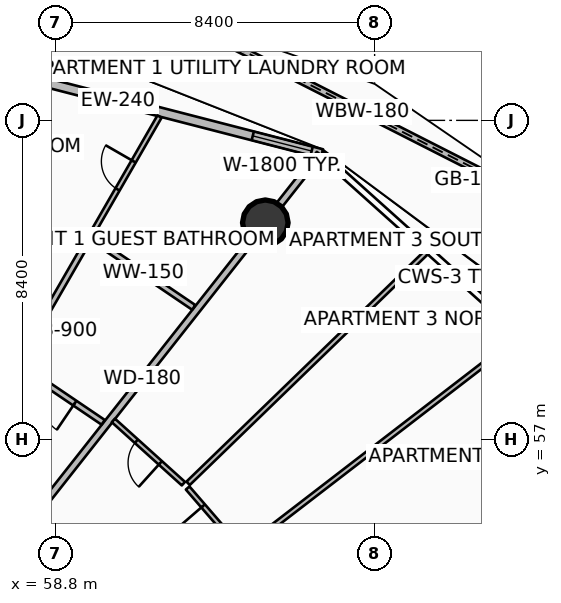
"""IFC4 building model, lengths in metres.
Left out: names, types, materials, properties, quantities, classifications, styles, units other than length and angle.
Written with IfcOpenShell. Run it as: python <this file> out.ifc"""

import sys

from ifc_helpers import new_model, si_unit, direction, frame, frame_2d, origin, origin_2d, place, context, subcontext, project, spatial, polyline, rectangle, circle, outline, extrude, element, fill, save


model = new_model("IFC4")
c1 = context("Model", 3, precision=1e-05, world=origin(), true_north=direction((0.0, 1.0)))
c2 = subcontext(c1, "Body", "Model", "MODEL_VIEW")
j1 = project(units=[si_unit("LENGTHUNIT", "METRE"), si_unit("PLANEANGLEUNIT", "RADIAN")], contexts=[c1])
p1 = place(None, origin())
s1 = spatial("IfcSite", under=j1, at=p1, CompositionType="ELEMENT")
p2 = place(p1, origin())
s2 = spatial("IfcBuilding", under=s1, at=p2, CompositionType="ELEMENT")
p3 = place(p2, frame((0.0, 0.0, 108.9)))
s3 = spatial("IfcBuildingStorey", under=s2, at=p3, CompositionType="ELEMENT", Elevation=108.9)
p4 = place(p3, frame((64.323, 62.706, 0.0), z_axis=(0.0, 0.0, 1.0), x_axis=(1.0, 0.0, 0.0)))
e1 = element("IfcColumn", 1, at=p4, inside=s3, PredefinedType="COLUMN", context=c2, shape_type="SweptSolid", body=[
    extrude(circle(Radius=0.6, at=origin_2d()), origin(), (0.0, 0.0, 1.0), 3.5),
])
p5 = place(p3, frame((72.201, 62.926, 0.0), z_axis=(0.0, 0.0, 1.0), x_axis=(-0.891327308183, 0.453360375074, 0.0)))
e2 = element("IfcWall", 2, at=p5, inside=s3, PredefinedType="PARAPET", context=c2, shape_type="SweptSolid", body=[
    extrude(outline(polyline([(0.0, 0.0), (11.943, 0.0), (11.942, 1.348), (5.971, 1.562), (0.0, 1.747), (0.0, 0.0)])), frame((0.0, 0.09, 0.0), z_axis=(0.0, -1.0, 0.0), x_axis=(1.0, 0.0, 0.0)), (0.0, 0.0, 1.0), 0.18),
])
p6 = place(p3, frame((65.814, 64.523, 0.0), z_axis=(0.0, 0.0, 1.0), x_axis=(-0.968356180858, 0.249572248045, 0.0)))
e3 = element("IfcWall", 3, at=p6, inside=s3, PredefinedType="SOLIDWALL", context=c2, shape_type="SweptSolid", body=[
    extrude(rectangle(XDim=11.084, YDim=0.24, at=frame_2d((5.542, 0.0))), origin(), (0.0, 0.0, 1.0), 2.45),
])
p7 = place(p6, frame((8.865, 0.0, 0.0)))
e4 = element("IfcOpeningElement", 4, at=p7, cuts=e3, PredefinedType="OPENING", context=c2, shape_type="SweptSolid", body=[
    extrude(rectangle(XDim=1.45, YDim=2.15, at=frame_2d((0.725, 1.075))), frame((0.0, 0.13, 0.0), z_axis=(0.0, -1.0, 0.0), x_axis=(1.0, 0.0, 0.0)), (0.0, 0.0, 1.0), 0.26),
])
p8 = place(p6, frame((0.28, 0.0, 0.65)))
e5 = element("IfcOpeningElement", 5, at=p8, cuts=e3, PredefinedType="OPENING", context=c2, shape_type="SweptSolid", body=[
    extrude(rectangle(XDim=1.6, YDim=1.5, at=frame_2d((0.8, 0.75))), frame((0.0, 0.13, 0.0), z_axis=(0.0, -1.0, 0.0), x_axis=(1.0, 0.0, 0.0)), (0.0, 0.0, 1.0), 0.26),
])
p9 = place(p3, frame((56.425, 52.686, 0.0), z_axis=(0.0, 0.0, 1.0), x_axis=(0.619083417853, 0.785325233098, 0.0)))
e6 = element("IfcWall", 6, at=p9, inside=s3, PredefinedType="PARTITIONING", context=c2, shape_type="SweptSolid", body=[
    extrude(rectangle(XDim=15.063, YDim=0.18, at=frame_2d((7.532, 0.0))), origin(), (0.0, 0.0, 1.0), 2.94),
])
p10 = place(p3, frame((60.057, 57.455, 0.0), z_axis=(0.0, 0.0, 1.0), x_axis=(-0.828073269886, 0.560619888783, 0.0)))
e7 = element("IfcWall", 7, at=p10, inside=s3, PredefinedType="PARTITIONING", context=c2, shape_type="SweptSolid", body=[
    extrude(rectangle(XDim=2.649, YDim=0.15, at=frame_2d((1.324, 0.0))), origin(), (0.0, 0.0, 1.0), 2.94),
])
p11 = place(p10, frame((0.899, 0.0, 0.0)))
e8 = element("IfcOpeningElement", 8, at=p11, cuts=e7, PredefinedType="OPENING", context=c2, shape_type="SweptSolid", body=[
    extrude(rectangle(XDim=0.85, YDim=2.06, at=frame_2d((0.425, 1.03))), frame((0.0, 0.085, 0.0), z_axis=(0.0, -1.0, 0.0), x_axis=(1.0, 0.0, 0.0)), (0.0, 0.0, 1.0), 0.17),
])
p12 = place(p3, frame((62.44, 60.479, 0.0), z_axis=(0.0, 0.0, 1.0), x_axis=(-0.828057808374, 0.560642725798, 0.0)))
e9 = element("IfcWall", 9, at=p12, inside=s3, PredefinedType="PARTITIONING", context=c2, shape_type="SweptSolid", body=[
    extrude(rectangle(XDim=3.206, YDim=0.15, at=frame_2d((1.603, 0.0))), origin(), (0.0, 0.0, 1.0), 2.94),
])
p13 = place(p3, frame((57.834, 59.069, 0.0), z_axis=(0.0, 0.0, 1.0), x_axis=(0.49925269443, 0.866456431164, 0.0)))
e10 = element("IfcWall", 10, at=p13, inside=s3, PredefinedType="PARTITIONING", context=c2, shape_type="SweptSolid", body=[
    extrude(rectangle(XDim=3.72, YDim=0.15, at=frame_2d((1.86, 0.0))), origin(), (0.0, 0.0, 1.0), 2.94),
])
p14 = place(p3, frame((59.756, 62.405, 0.0), z_axis=(0.0, 0.0, 1.0), x_axis=(0.499189934721, 0.866492590316, 0.0)))
e11 = element("IfcWall", 11, at=p14, inside=s3, PredefinedType="PARTITIONING", context=c2, shape_type="SweptSolid", body=[
    extrude(rectangle(XDim=3.573, YDim=0.125, at=frame_2d((1.786, 0.0))), origin(), (0.0, 0.0, 1.0), 2.94),
])
p15 = place(p14, frame((1.361, 0.0, 0.0)))
e12 = element("IfcOpeningElement", 12, at=p15, cuts=e11, PredefinedType="OPENING", context=c2, shape_type="SweptSolid", body=[
    extrude(rectangle(XDim=0.85, YDim=2.06, at=frame_2d((0.425, 1.03))), frame((0.0, 0.073, 0.0), z_axis=(0.0, -1.0, 0.0), x_axis=(1.0, 0.0, 0.0)), (0.0, 0.0, 1.0), 0.145),
])
p16 = place(p3, frame((65.373, 51.729, 0.0), z_axis=(0.0, 0.0, 1.0), x_axis=(0.872500794254, 0.488612693272, 0.0)))
e13 = element("IfcWall", 13, at=p16, inside=s3, PredefinedType="PARTITIONING", context=c2, shape_type="SweptSolid", body=[
    extrude(rectangle(XDim=9.568, YDim=0.125, at=frame_2d((4.784, 0.0))), origin(), (0.0, 0.0, 1.0), 2.94),
])
p17 = place(p3, frame((63.773, 54.136, 0.0), z_axis=(0.0, 0.0, 1.0), x_axis=(0.792546059912, 0.609812055405, 0.0)))
e14 = element("IfcWall", 14, at=p17, inside=s3, PredefinedType="PARTITIONING", context=c2, shape_type="SweptSolid", body=[
    extrude(rectangle(XDim=9.201, YDim=0.125, at=frame_2d((4.601, 0.0))), origin(), (0.0, 0.0, 1.0), 2.94),
])
p18 = place(p3, frame((62.292, 55.85, 0.0), z_axis=(0.0, 0.0, 1.0), x_axis=(0.718126885769, 0.695912189817, 0.0)))
e15 = element("IfcWall", 15, at=p18, inside=s3, PredefinedType="PARTITIONING", context=c2, shape_type="SweptSolid", body=[
    extrude(rectangle(XDim=8.781, YDim=0.125, at=frame_2d((4.391, 0.0))), origin(), (0.0, 0.0, 1.0), 2.94),
])
p19 = place(p3, frame((63.65, 54.142, 0.0), z_axis=(0.0, 0.0, 1.0), x_axis=(-0.65397173696, 0.756518980104, 0.0)))
e16 = element("IfcWall", 16, at=p19, inside=s3, PredefinedType="PARTITIONING", context=c2, shape_type="SweptSolid", body=[
    extrude(rectangle(XDim=2.095, YDim=0.125, at=frame_2d((1.047, 0.0))), origin(), (0.0, 0.0, 1.0), 2.94),
])
p20 = place(p19, frame((0.623, 0.0, 0.0)))
e17 = element("IfcOpeningElement", 17, at=p20, cuts=e16, PredefinedType="OPENING", context=c2, shape_type="SweptSolid", body=[
    extrude(rectangle(XDim=0.85, YDim=2.06, at=frame_2d((0.425, 1.03))), frame((0.0, 0.073, 0.0), z_axis=(0.0, -1.0, 0.0), x_axis=(1.0, 0.0, 0.0)), (0.0, 0.0, 1.0), 0.145),
])
p21 = place(p3, frame((62.168, 55.841, 0.0), z_axis=(0.0, 0.0, 1.0), x_axis=(-0.742266682882, 0.67010459742, 0.0)))
e18 = element("IfcWall", 18, at=p21, inside=s3, PredefinedType="PARTITIONING", context=c2, shape_type="SweptSolid", body=[
    extrude(rectangle(XDim=2.483, YDim=0.125, at=frame_2d((1.242, 0.0))), origin(), (0.0, 0.0, 1.0), 2.94),
])
p22 = place(p21, frame((0.817, 0.0, 0.0)))
e19 = element("IfcOpeningElement", 19, at=p22, cuts=e18, PredefinedType="OPENING", context=c2, shape_type="SweptSolid", body=[
    extrude(rectangle(XDim=0.85, YDim=2.06, at=frame_2d((0.425, 1.03))), frame((0.0, 0.073, 0.0), z_axis=(0.0, -1.0, 0.0), x_axis=(1.0, 0.0, 0.0)), (0.0, 0.0, 1.0), 0.145),
])
p23 = place(p8, origin())
e20 = element("IfcWindow", 20, at=p23, inside=s3, PartitioningType="SINGLE_PANEL", PredefinedType="WINDOW", context=c2, shape_type="SweptSolid", body=[
    extrude(rectangle(XDim=1.6, YDim=1.5, at=frame_2d((0.8, 0.75))), frame((0.0, 0.03, 0.0), z_axis=(0.0, -1.0, 0.0), x_axis=(1.0, 0.0, 0.0)), (0.0, 0.0, 1.0), 0.06),
])
fill(e5, e20)
p24 = place(p11, origin())
e21 = element("IfcDoor", 21, at=p24, inside=s3, OperationType="SINGLE_SWING_LEFT", PredefinedType="DOOR", context=c2, shape_type="SweptSolid", body=[
    extrude(rectangle(XDim=0.85, YDim=2.06, at=frame_2d((0.425, 1.03))), frame((0.0, 0.025, 0.0), z_axis=(0.0, -1.0, 0.0), x_axis=(1.0, 0.0, 0.0)), (0.0, 0.0, 1.0), 0.05),
])
fill(e8, e21)
p25 = place(p15, origin())
e22 = element("IfcDoor", 22, at=p25, inside=s3, OperationType="SINGLE_SWING_RIGHT", PredefinedType="DOOR", context=c2, shape_type="SweptSolid", body=[
    extrude(rectangle(XDim=0.85, YDim=2.06, at=frame_2d((0.425, 1.03))), frame((0.0, 0.025, 0.0), z_axis=(0.0, -1.0, 0.0), x_axis=(1.0, 0.0, 0.0)), (0.0, 0.0, 1.0), 0.05),
])
fill(e12, e22)
p26 = place(p20, origin())
e23 = element("IfcDoor", 23, at=p26, inside=s3, OperationType="SINGLE_SWING_RIGHT", PredefinedType="DOOR", context=c2, shape_type="SweptSolid", body=[
    extrude(rectangle(XDim=0.85, YDim=2.06, at=frame_2d((0.425, 1.03))), frame((0.0, 0.025, 0.0), z_axis=(0.0, -1.0, 0.0), x_axis=(1.0, 0.0, 0.0)), (0.0, 0.0, 1.0), 0.05),
])
fill(e17, e23)
p27 = place(p22, origin())
e24 = element("IfcDoor", 24, at=p27, inside=s3, OperationType="SINGLE_SWING_LEFT", PredefinedType="DOOR", context=c2, shape_type="SweptSolid", body=[
    extrude(rectangle(XDim=0.85, YDim=2.06, at=frame_2d((0.425, 1.03))), frame((0.0, 0.025, 0.0), z_axis=(0.0, -1.0, 0.0), x_axis=(1.0, 0.0, 0.0)), (0.0, 0.0, 1.0), 0.05),
])
fill(e19, e24)
save(model, sys.argv[1])
